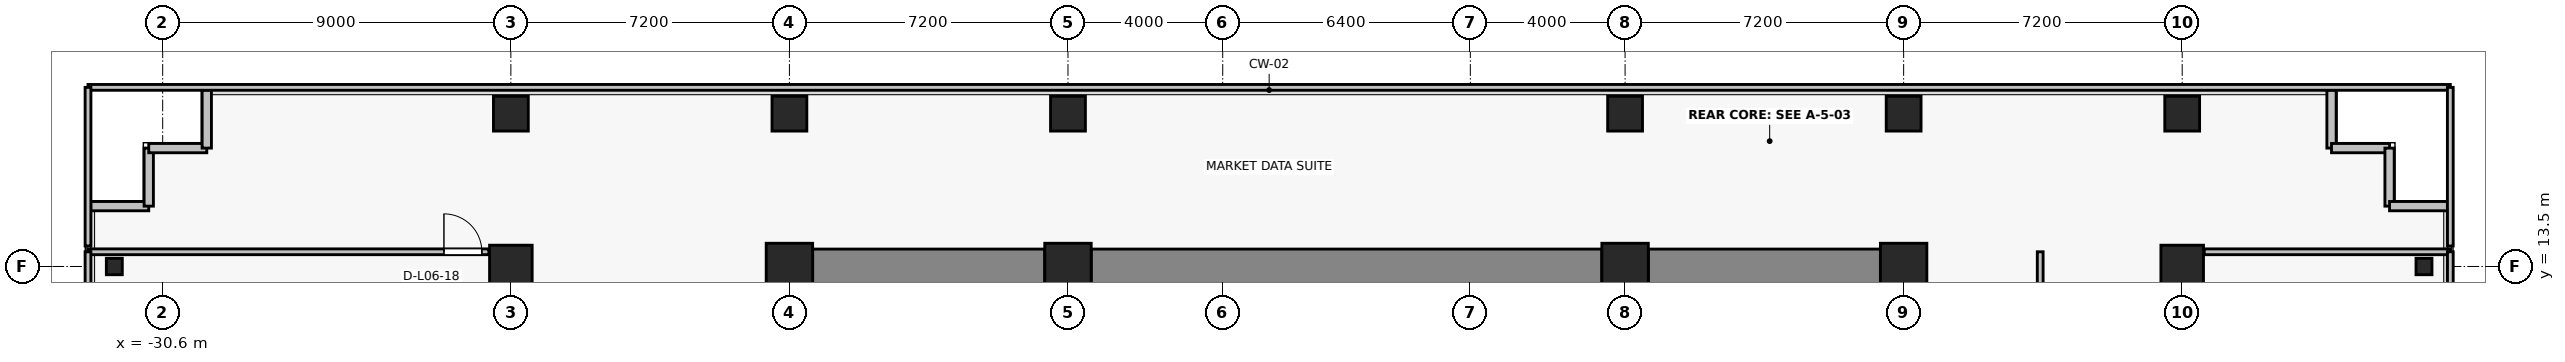
"""IFC4 building model, lengths in metres.
Left out: names, types, materials, properties, quantities, classifications, styles, units other than length and angle.
Written with IfcOpenShell. Run it as: python <this file> out.ifc"""

import sys

from ifc_helpers import new_model, si_unit, direction, frame, frame_2d, origin, origin_2d, place, context, subcontext, project, spatial, rectangle, i_section, extrude, source, transform, mapped, element, fill, save


model = new_model("IFC4")
c1 = context("Model", 3, precision=1e-05, world=origin(), true_north=direction((0.0, 1.0)))
c2 = subcontext(c1, "Body", "Model", "MODEL_VIEW")
j1 = project(units=[si_unit("LENGTHUNIT", "METRE"), si_unit("PLANEANGLEUNIT", "RADIAN")], contexts=[c1])
p1 = place(None, origin())
s1 = spatial("IfcSite", under=j1, at=p1, CompositionType="ELEMENT")
p2 = place(p1, origin())
s2 = spatial("IfcBuilding", under=s1, at=p2, CompositionType="ELEMENT")
p3 = place(p2, frame((0.0, 0.0, 27.4)))
s3 = spatial("IfcBuildingStorey", under=s2, at=p3, CompositionType="ELEMENT", Elevation=27.4)
for number, where, z_axis, x_axis in (
    (1, (-14.4, 13.5, 0.0), (0.0, 0.0, 1.0), (1.0, 0.0, 0.0)),
    (2, (-7.2, 13.5, 0.0), (0.0, 0.0, 1.0), (1.0, 0.0, 0.0)),
    (3, (7.2, 13.5, 0.0), (0.0, 0.0, 1.0), (1.0, 0.0, 0.0)),
    (4, (14.4, 13.5, 0.0), (0.0, 0.0, 1.0), (1.0, 0.0, 0.0)),
):
    element("IfcColumn", number, at=place(p3, frame(where, z_axis=z_axis, x_axis=x_axis)), inside=s3, PredefinedType="COLUMN", context=c2, shape_type="SweptSolid", body=[
        extrude(rectangle(XDim=1.2, YDim=1.2, at=origin_2d()), origin(), (0.0, 0.0, 1.0), 3.3),
    ])
for number, where, z_axis, x_axis in (
    (5, (-21.6, 13.5, 0.0), (0.0, 0.0, 1.0), (1.0, 0.0, 0.0)),
    (6, (21.6, 13.5, 0.0), (0.0, 0.0, 1.0), (1.0, 0.0, 0.0)),
):
    element("IfcColumn", number, at=place(p3, frame(where, z_axis=z_axis, x_axis=x_axis)), inside=s3, PredefinedType="COLUMN", context=c2, shape_type="SweptSolid", body=[
        extrude(rectangle(XDim=1.1, YDim=1.1, at=origin_2d()), origin(), (0.0, 0.0, 1.0), 3.3),
    ])
for number, where, z_axis, x_axis in (
    (7, (-14.4, 17.45, 0.0), (0.0, 0.0, 1.0), (1.0, 0.0, 0.0)),
    (8, (-7.2, 17.45, 0.0), (0.0, 0.0, 1.0), (1.0, 0.0, 0.0)),
    (9, (7.2, 17.45, 0.0), (0.0, 0.0, 1.0), (1.0, 0.0, 0.0)),
    (10, (14.4, 17.45, 0.0), (0.0, 0.0, 1.0), (1.0, 0.0, 0.0)),
    (11, (-21.6, 17.45, 0.0), (0.0, 0.0, 1.0), (1.0, 0.0, 0.0)),
    (12, (21.6, 17.45, 0.0), (0.0, 0.0, 1.0), (1.0, 0.0, 0.0)),
):
    element("IfcColumn", number, at=place(p3, frame(where, z_axis=z_axis, x_axis=x_axis)), inside=s3, PredefinedType="COLUMN", context=c2, shape_type="SweptSolid", body=[
        extrude(rectangle(XDim=0.9, YDim=0.9, at=origin_2d()), origin(), (0.0, 0.0, 1.0), 3.3),
    ])
for number, where, z_axis, x_axis in (
    (13, (-31.85, 13.5, 0.0), (0.0, 0.0, 1.0), (1.0, 0.0, 0.0)),
    (14, (27.85, 13.5, 0.0), (0.0, 0.0, 1.0), (1.0, 0.0, 0.0)),
):
    element("IfcColumn", number, at=place(p3, frame(where, z_axis=z_axis, x_axis=x_axis)), inside=s3, PredefinedType="COLUMN", context=c2, shape_type="SweptSolid", body=[
        extrude(i_section(OverallWidth=0.412, OverallDepth=0.425, WebThickness=0.026, FlangeThickness=0.039, FilletRadius=0.015, at=origin_2d()), origin(), (0.0, 0.0, 1.0), 3.3),
    ])
p4 = place(p3, frame((-13.8, 13.5, 0.0), z_axis=(0.0, 0.0, 1.0), x_axis=(1.0, 0.0, 0.0)))
e15 = element("IfcWall", 15, at=p4, inside=s3, PredefinedType="SHEAR", context=c2, shape_type="SweptSolid", body=[
    extrude(rectangle(XDim=6.0, YDim=0.9, at=frame_2d((3.0, 0.0))), origin(), (0.0, 0.0, 1.0), 3.075),
])
p5 = place(p3, frame((-6.6, 13.5, 0.0), z_axis=(0.0, 0.0, 1.0), x_axis=(1.0, 0.0, 0.0)))
e16 = element("IfcWall", 16, at=p5, inside=s3, PredefinedType="SHEAR", context=c2, shape_type="SweptSolid", body=[
    extrude(rectangle(XDim=13.2, YDim=0.9, at=frame_2d((6.6, 0.0))), origin(), (0.0, 0.0, 1.0), 3.075),
])
p6 = place(p3, frame((7.8, 13.5, 0.0), z_axis=(0.0, 0.0, 1.0), x_axis=(1.0, 0.0, 0.0)))
e17 = element("IfcWall", 17, at=p6, inside=s3, PredefinedType="SHEAR", context=c2, shape_type="SweptSolid", body=[
    extrude(rectangle(XDim=6.0, YDim=0.9, at=frame_2d((3.0, 0.0))), origin(), (0.0, 0.0, 1.0), 3.075),
])
for number, where, z_axis, x_axis in (
    (18, (-30.96, 15.06, 0.0), (0.0, 0.0, 1.0), (-1.0, 0.0, 0.0)),
    (19, (-30.96, 16.56, 0.0), (0.0, 0.0, 1.0), (0.0, -1.0, 0.0)),
    (20, (-29.46, 16.56, 0.0), (0.0, 0.0, 1.0), (-1.0, 0.0, 0.0)),
    (21, (-29.46, 18.06, 0.0), (0.0, 0.0, 1.0), (0.0, -1.0, 0.0)),
    (22, (25.46, 16.56, 0.0), (0.0, 0.0, 1.0), (0.0, 1.0, 0.0)),
    (23, (26.96, 16.56, 0.0), (0.0, 0.0, 1.0), (-1.0, 0.0, 0.0)),
    (24, (26.96, 15.06, 0.0), (0.0, 0.0, 1.0), (0.0, 1.0, 0.0)),
    (25, (28.46, 15.06, 0.0), (0.0, 0.0, 1.0), (-1.0, 0.0, 0.0)),
):
    element("IfcWall", number, at=place(p3, frame(where, z_axis=z_axis, x_axis=x_axis)), inside=s3, PredefinedType="SOLIDWALL", context=c2, shape_type="SweptSolid", body=[
        extrude(rectangle(XDim=1.5, YDim=0.24, at=frame_2d((0.75, 0.0))), origin(), (0.0, 0.0, 1.0), 3.075),
    ])
p7 = place(p3, frame((-32.53, 13.88, 0.0), z_axis=(0.0, 0.0, 1.0), x_axis=(1.0, 0.0, 0.0)))
e26 = element("IfcWall", 26, at=p7, inside=s3, PredefinedType="PARTITIONING", context=c2, shape_type="SweptSolid", body=[
    extrude(rectangle(XDim=10.36, YDim=0.15, at=frame_2d((5.18, 0.0))), origin(), (0.0, 0.0, 1.0), 3.075),
])
p8 = place(p7, frame((9.2, 0.0, 0.0)))
e27 = element("IfcOpeningElement", 27, at=p8, cuts=e26, PredefinedType="OPENING", context=c2, shape_type="SweptSolid", body=[
    extrude(rectangle(XDim=0.98, YDim=2.15, at=frame_2d((0.49, 1.075))), frame((0.0, 0.085, 0.0), z_axis=(0.0, -1.0, 0.0), x_axis=(1.0, 0.0, 0.0)), (0.0, 0.0, 1.0), 0.17),
])
p9 = place(p3, frame((-32.53, -1.77, 0.0), z_axis=(0.0, 0.0, 1.0), x_axis=(0.0, 1.0, 0.0)))
e28 = element("IfcWall", 28, at=p9, inside=s3, PredefinedType="PARTITIONING", context=c2, shape_type="SweptSolid", body=[
    extrude(rectangle(XDim=15.65, YDim=0.15, at=frame_2d((7.825, 0.0))), origin(), (0.0, 0.0, 1.0), 3.075),
])
p10 = place(p3, frame((22.17, 13.88, 0.0), z_axis=(0.0, 0.0, 1.0), x_axis=(1.0, 0.0, 0.0)))
e29 = element("IfcWall", 29, at=p10, inside=s3, PredefinedType="PARTITIONING", context=c2, shape_type="SweptSolid", body=[
    extrude(rectangle(XDim=6.36, YDim=0.15, at=frame_2d((3.18, 0.0))), origin(), (0.0, 0.0, 1.0), 3.075),
])
p11 = place(p3, frame((17.93, 4.522, 0.0), z_axis=(0.0, 0.0, 1.0), x_axis=(0.0, 1.0, 0.0)))
e30 = element("IfcWall", 30, at=p11, inside=s3, PredefinedType="PARTITIONING", context=c2, shape_type="SweptSolid", body=[
    extrude(rectangle(XDim=9.358, YDim=0.15, at=frame_2d((4.679, 0.0))), origin(), (0.0, 0.0, 1.0), 2.465),
])
p12 = place(p11, frame((4.189, 0.0, 0.0)))
e31 = element("IfcOpeningElement", 31, at=p12, cuts=e30, PredefinedType="OPENING", context=c2, shape_type="SweptSolid", body=[
    extrude(rectangle(XDim=0.98, YDim=2.15, at=frame_2d((0.49, 1.075))), frame((0.0, 0.085, 0.0), z_axis=(0.0, -1.0, 0.0), x_axis=(1.0, 0.0, 0.0)), (0.0, 0.0, 1.0), 0.17),
])
p13 = place(p3, frame((28.53, 13.88, 0.0), z_axis=(0.0, 0.0, 1.0), x_axis=(0.0, -1.0, 0.0)))
e32 = element("IfcWall", 32, at=p13, inside=s3, PredefinedType="PARTITIONING", context=c2, shape_type="SweptSolid", body=[
    extrude(rectangle(XDim=9.358, YDim=0.15, at=frame_2d((4.679, 0.0))), origin(), (0.0, 0.0, 1.0), 3.075),
])
p14 = place(p3, frame((-32.53, 18.13, 0.0), z_axis=(0.0, 0.0, 1.0), x_axis=(1.0, 0.0, 0.0)))
e33 = element("IfcWall", 33, at=p14, inside=s3, PredefinedType="PARTITIONING", context=c2, shape_type="SweptSolid", body=[
    extrude(rectangle(XDim=61.06, YDim=0.15, at=frame_2d((30.53, 0.0))), origin(), (0.0, 0.0, 1.0), 3.075),
])
for number, where, z_axis, x_axis in (
    (34, (-32.53, 14.03, 0.0), (0.0, 0.0, 1.0), (0.0, 1.0, 0.0)),
    (35, (28.53, 18.13, 0.0), (0.0, 0.0, 1.0), (0.0, -1.0, 0.0)),
):
    element("IfcWall", number, at=place(p3, frame(where, z_axis=z_axis, x_axis=x_axis)), inside=s3, PredefinedType="PARTITIONING", context=c2, shape_type="SweptSolid", body=[
        extrude(rectangle(XDim=4.1, YDim=0.15, at=frame_2d((2.05, 0.0))), origin(), (0.0, 0.0, 1.0), 3.075),
    ])
m1 = source(origin(), c2, "Body", "SweptSolid", [
    extrude(rectangle(XDim=0.98, YDim=2.15, at=frame_2d((0.49, 1.075))), frame((0.0, 0.025, 0.0), z_axis=(0.0, -1.0, 0.0), x_axis=(1.0, 0.0, 0.0)), (0.0, 0.0, 1.0), 0.05),
])
p15 = place(p8, origin())
e36 = element("IfcDoor", 36, at=p15, inside=s3, OperationType="SINGLE_SWING_LEFT", PredefinedType="DOOR", context=c2, shape_type="MappedRepresentation", body=[
    mapped(m1, transform((0.0, 0.0, 0.0), x_axis=(1.0, 0.0, 0.0), y_axis=(0.0, 1.0, 0.0), z_axis=(0.0, 0.0, 1.0), scale=1.0)),
])
fill(e27, e36)
save(model, sys.argv[1])
